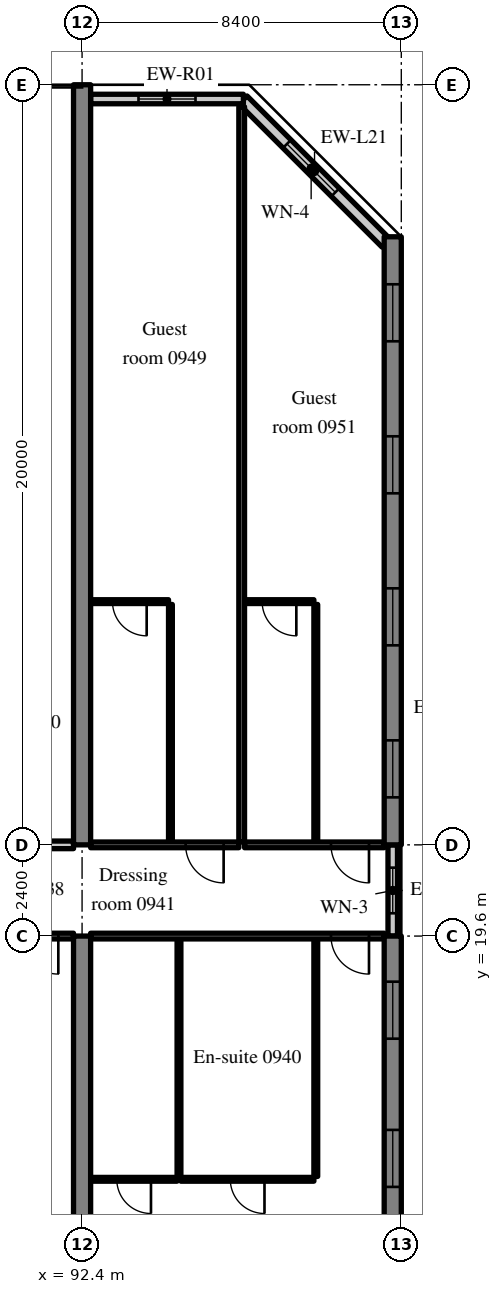
"""IFC4 building model, lengths in metres.
Left out: names, types, materials, properties, quantities, classifications, styles, units other than length and angle.
Written with IfcOpenShell. Run it as: python <this file> out.ifc"""

import sys

from ifc_helpers import new_model, si_unit, direction, frame, frame_2d, origin, place, context, subcontext, project, spatial, rectangle, extrude, source, transform, mapped, element, fill, save


model = new_model("IFC4")
c1 = context("Model", 3, precision=1e-05, world=origin(), true_north=direction((0.0, 1.0)))
c2 = subcontext(c1, "Body", "Model", "MODEL_VIEW")
j1 = project(units=[si_unit("LENGTHUNIT", "METRE"), si_unit("PLANEANGLEUNIT", "RADIAN")], contexts=[c1])
p1 = place(None, origin())
s1 = spatial("IfcSite", under=j1, at=p1, CompositionType="ELEMENT")
p2 = place(p1, origin())
s2 = spatial("IfcBuilding", under=s1, at=p2, CompositionType="ELEMENT")
p3 = place(p2, frame((0.0, 0.0, 43.0)))
s3 = spatial("IfcBuildingStorey", under=s2, at=p3, CompositionType="ELEMENT", Elevation=43.0)
m1 = source(origin(), c2, "Body", "SweptSolid", [
    extrude(rectangle(XDim=19.6, YDim=0.45, at=frame_2d((9.8, 0.0))), origin(), (0.0, 0.0, 1.0), 3.52),
])
p4 = place(p3, frame((92.4, 0.0, 0.0), z_axis=(0.0, 0.0, 1.0), x_axis=(0.0, 1.0, 0.0)))
e1 = element("IfcWall", 1, at=p4, inside=s3, PredefinedType="SHEAR", context=c2, shape_type="MappedRepresentation", body=[
    mapped(m1, transform((0.0, 0.0, 0.0), scale=1.0)),
])
m2 = source(origin(), c2, "Body", "SweptSolid", [
    extrude(rectangle(XDim=20.0, YDim=0.45, at=frame_2d((10.0, 0.0))), origin(), (0.0, 0.0, 1.0), 3.52),
])
p5 = place(p3, frame((92.4, 22.0, 0.0), z_axis=(0.0, 0.0, 1.0), x_axis=(0.0, 1.0, 0.0)))
e2 = element("IfcWall", 2, at=p5, inside=s3, PredefinedType="SHEAR", context=c2, shape_type="MappedRepresentation", body=[
    mapped(m2, transform((0.0, 0.0, 0.0), scale=1.0)),
])
m3 = source(origin(), c2, "Body", "SweptSolid", [
    extrude(rectangle(XDim=15.6, YDim=0.45, at=frame_2d((7.8, 0.0))), origin(), (0.0, 0.0, 1.0), 3.52),
])
p6 = place(p3, frame((100.575, 4.0, 0.0), z_axis=(0.0, 0.0, 1.0), x_axis=(0.0, 1.0, 0.0)))
e3 = element("IfcWall", 3, at=p6, inside=s3, PredefinedType="SHEAR", context=c2, shape_type="MappedRepresentation", body=[
    mapped(m3, transform((0.0, 0.0, 0.0), scale=1.0)),
])
m4 = source(origin(), c2, "Body", "SweptSolid", [
    extrude(rectangle(XDim=1.5, YDim=1.5, at=frame_2d((0.75, 0.75))), frame((0.0, 0.235, 0.0), z_axis=(0.0, -1.0, 0.0), x_axis=(1.0, 0.0, 0.0)), (0.0, 0.0, 1.0), 0.47),
])
p7 = place(p6, frame((1.2, 0.0, 0.9)))
e4 = element("IfcOpeningElement", 4, at=p7, cuts=e3, PredefinedType="OPENING", context=c2, shape_type="MappedRepresentation", body=[
    mapped(m4, transform((0.0, 0.0, 0.0), scale=1.0)),
])
p8 = place(p6, frame((5.1, 0.0, 0.9)))
e5 = element("IfcOpeningElement", 5, at=p8, cuts=e3, PredefinedType="OPENING", context=c2, shape_type="MappedRepresentation", body=[
    mapped(m4, transform((0.0, 0.0, 0.0), scale=1.0)),
])
p9 = place(p6, frame((9.0, 0.0, 0.9)))
e6 = element("IfcOpeningElement", 6, at=p9, cuts=e3, PredefinedType="OPENING", context=c2, shape_type="MappedRepresentation", body=[
    mapped(m4, transform((0.0, 0.0, 0.0), scale=1.0)),
])
p10 = place(p6, frame((12.9, 0.0, 0.9)))
e7 = element("IfcOpeningElement", 7, at=p10, cuts=e3, PredefinedType="OPENING", context=c2, shape_type="MappedRepresentation", body=[
    mapped(m4, transform((0.0, 0.0, 0.0), scale=1.0)),
])
m5 = source(origin(), c2, "Body", "SweptSolid", [
    extrude(rectangle(XDim=16.0, YDim=0.45, at=frame_2d((8.0, 0.0))), origin(), (0.0, 0.0, 1.0), 3.52),
])
p11 = place(p3, frame((100.575, 22.0, 0.0), z_axis=(0.0, 0.0, 1.0), x_axis=(0.0, 1.0, 0.0)))
e8 = element("IfcWall", 8, at=p11, inside=s3, PredefinedType="SHEAR", context=c2, shape_type="MappedRepresentation", body=[
    mapped(m5, transform((0.0, 0.0, 0.0), scale=1.0)),
])
p12 = place(p11, frame((1.25, 0.0, 0.9)))
e9 = element("IfcOpeningElement", 9, at=p12, cuts=e8, PredefinedType="OPENING", context=c2, shape_type="MappedRepresentation", body=[
    mapped(m4, transform((0.0, 0.0, 0.0), scale=1.0)),
])
p13 = place(p11, frame((5.25, 0.0, 0.9)))
e10 = element("IfcOpeningElement", 10, at=p13, cuts=e8, PredefinedType="OPENING", context=c2, shape_type="MappedRepresentation", body=[
    mapped(m4, transform((0.0, 0.0, 0.0), scale=1.0)),
])
p14 = place(p11, frame((9.25, 0.0, 0.9)))
e11 = element("IfcOpeningElement", 11, at=p14, cuts=e8, PredefinedType="OPENING", context=c2, shape_type="MappedRepresentation", body=[
    mapped(m4, transform((0.0, 0.0, 0.0), scale=1.0)),
])
p15 = place(p11, frame((13.25, 0.0, 0.9)))
e12 = element("IfcOpeningElement", 12, at=p15, cuts=e8, PredefinedType="OPENING", context=c2, shape_type="MappedRepresentation", body=[
    mapped(m4, transform((0.0, 0.0, 0.0), scale=1.0)),
])
m6 = source(origin(), c2, "Body", "SweptSolid", [
    extrude(rectangle(XDim=5.326, YDim=0.3, at=frame_2d((2.663, 0.0))), origin(), (0.0, 0.0, 1.0), 3.52),
])
p16 = place(p3, frame((100.4, 37.834, 0.0), z_axis=(0.0, 0.0, 1.0), x_axis=(-0.707083859269, 0.707129702361, 0.0)))
e13 = element("IfcWall", 13, at=p16, inside=s3, PredefinedType="SOLIDWALL", context=c2, shape_type="MappedRepresentation", body=[
    mapped(m6, transform((0.0, 0.0, 0.0), scale=1.0)),
])
m7 = source(origin(), c2, "Body", "SweptSolid", [
    extrude(rectangle(XDim=1.8, YDim=1.5, at=frame_2d((0.9, 0.75))), frame((0.0, 0.16, 0.0), z_axis=(0.0, -1.0, 0.0), x_axis=(1.0, 0.0, 0.0)), (0.0, 0.0, 1.0), 0.32),
])
p17 = place(p16, frame((1.889, 0.0, 0.9)))
e14 = element("IfcOpeningElement", 14, at=p17, cuts=e13, PredefinedType="OPENING", context=c2, shape_type="MappedRepresentation", body=[
    mapped(m7, transform((0.0, 0.0, 0.0), scale=1.0)),
])
m8 = source(origin(), c2, "Body", "SweptSolid", [
    extrude(rectangle(XDim=4.02, YDim=0.25, at=frame_2d((2.01, 0.0))), origin(), (0.0, 0.0, 1.0), 2.82),
])
p18 = place(p3, frame((96.645, 41.625, 0.0), z_axis=(0.0, 0.0, 1.0), x_axis=(-1.0, 0.0, 0.0)))
e15 = element("IfcWall", 15, at=p18, inside=s3, PredefinedType="SOLIDWALL", context=c2, shape_type="MappedRepresentation", body=[
    mapped(m8, transform((0.0, 0.0, 0.0), scale=1.0)),
])
m9 = source(origin(), c2, "Body", "SweptSolid", [
    extrude(rectangle(XDim=1.5, YDim=1.5, at=frame_2d((0.75, 0.75))), frame((0.0, 0.135, 0.0), z_axis=(0.0, -1.0, 0.0), x_axis=(1.0, 0.0, 0.0)), (0.0, 0.0, 1.0), 0.27),
])
p19 = place(p18, frame((1.26, 0.0, 0.9)))
e16 = element("IfcOpeningElement", 16, at=p19, cuts=e15, PredefinedType="OPENING", context=c2, shape_type="MappedRepresentation", body=[
    mapped(m9, transform((0.0, 0.0, 0.0), scale=1.0)),
])
m10 = source(origin(), c2, "Body", "SweptSolid", [
    extrude(rectangle(XDim=2.4, YDim=0.25, at=frame_2d((1.2, 0.0))), origin(), (0.0, 0.0, 1.0), 2.62),
])
p20 = place(p3, frame((100.575, 19.6, 0.0), z_axis=(0.0, 0.0, 1.0), x_axis=(0.0, 1.0, 0.0)))
e17 = element("IfcWall", 17, at=p20, inside=s3, PredefinedType="SOLIDWALL", context=c2, shape_type="MappedRepresentation", body=[
    mapped(m10, transform((0.0, 0.0, 0.0), scale=1.0)),
])
m11 = source(origin(), c2, "Body", "SweptSolid", [
    extrude(rectangle(XDim=1.2, YDim=1.5, at=frame_2d((0.6, 0.75))), frame((0.0, 0.135, 0.0), z_axis=(0.0, -1.0, 0.0), x_axis=(1.0, 0.0, 0.0)), (0.0, 0.0, 1.0), 0.27),
])
p21 = place(p20, frame((0.6, 0.0, 0.9)))
e18 = element("IfcOpeningElement", 18, at=p21, cuts=e17, PredefinedType="OPENING", context=c2, shape_type="MappedRepresentation", body=[
    mapped(m11, transform((0.0, 0.0, 0.0), scale=1.0)),
])
m12 = source(origin(), c2, "Body", "SweptSolid", [
    extrude(rectangle(XDim=7.95, YDim=0.15, at=frame_2d((3.975, 0.0))), origin(), (0.0, 0.0, 1.0), 2.82),
])
p22 = place(p3, frame((84.225, 19.6, 0.0), z_axis=(0.0, 0.0, 1.0), x_axis=(1.0, 0.0, 0.0)))
e19 = element("IfcWall", 19, at=p22, inside=s3, PredefinedType="PARTITIONING", context=c2, shape_type="MappedRepresentation", body=[
    mapped(m12, transform((0.0, 0.0, 0.0), scale=1.0)),
])
m13 = source(origin(), c2, "Body", "SweptSolid", [
    extrude(rectangle(XDim=1.0, YDim=2.1, at=frame_2d((0.5, 1.05))), frame((0.0, 0.085, 0.0), z_axis=(0.0, -1.0, 0.0), x_axis=(1.0, 0.0, 0.0)), (0.0, 0.0, 1.0), 0.17),
])
p23 = place(p22, frame((6.55, 0.0, 0.0)))
e20 = element("IfcOpeningElement", 20, at=p23, cuts=e19, PredefinedType="OPENING", context=c2, shape_type="MappedRepresentation", body=[
    mapped(m13, transform((0.0, 0.0, 0.0), scale=1.0)),
])
m14 = source(origin(), c2, "Body", "SweptSolid", [
    extrude(rectangle(XDim=6.25, YDim=0.1, at=frame_2d((3.125, 0.0))), origin(), (0.0, 0.0, 1.0), 3.52),
])
for number, where, z_axis, x_axis in (
    (21, (98.55, 13.275, 0.0), (0.0, 0.0, 1.0), (0.0, 1.0, 0.0)),
    (22, (94.95, 13.275, 0.0), (0.0, 0.0, 1.0), (0.0, 1.0, 0.0)),
):
    element("IfcWall", number, at=place(p3, frame(where, z_axis=z_axis, x_axis=x_axis)), inside=s3, PredefinedType="PARTITIONING", context=c2, shape_type="MappedRepresentation", body=[
        mapped(m14, transform((0.0, 0.0, 0.0), scale=1.0)),
    ])
m15 = source(origin(), c2, "Body", "SweptSolid", [
    extrude(rectangle(XDim=3.5, YDim=0.1, at=frame_2d((1.75, 0.0))), origin(), (0.0, 0.0, 1.0), 3.52),
])
p24 = place(p3, frame((95.0, 13.2, 0.0), z_axis=(0.0, 0.0, 1.0), x_axis=(1.0, 0.0, 0.0)))
e23 = element("IfcWall", 23, at=p24, inside=s3, PredefinedType="PARTITIONING", context=c2, shape_type="MappedRepresentation", body=[
    mapped(m15, transform((0.0, 0.0, 0.0), scale=1.0)),
])
m16 = source(origin(), c2, "Body", "SweptSolid", [
    extrude(rectangle(XDim=0.9, YDim=2.1, at=frame_2d((0.45, 1.05))), frame((0.0, 0.06, 0.0), z_axis=(0.0, -1.0, 0.0), x_axis=(1.0, 0.0, 0.0)), (0.0, 0.0, 1.0), 0.12),
])
p25 = place(p24, frame((1.3, 0.0, 0.0)))
e24 = element("IfcOpeningElement", 24, at=p25, cuts=e23, PredefinedType="OPENING", context=c2, shape_type="MappedRepresentation", body=[
    mapped(m16, transform((0.0, 0.0, 0.0), scale=1.0)),
])
m17 = source(origin(), c2, "Body", "SweptSolid", [
    extrude(rectangle(XDim=2.275, YDim=0.1, at=frame_2d((1.137, 0.0))), origin(), (0.0, 0.0, 1.0), 3.52),
])
p26 = place(p3, frame((92.625, 13.2, 0.0), z_axis=(0.0, 0.0, 1.0), x_axis=(1.0, 0.0, 0.0)))
e25 = element("IfcWall", 25, at=p26, inside=s3, PredefinedType="PARTITIONING", context=c2, shape_type="MappedRepresentation", body=[
    mapped(m17, transform((0.0, 0.0, 0.0), scale=1.0)),
])
p27 = place(p26, frame((0.688, 0.0, 0.0)))
e26 = element("IfcOpeningElement", 26, at=p27, cuts=e25, PredefinedType="OPENING", context=c2, shape_type="MappedRepresentation", body=[
    mapped(m16, transform((0.0, 0.0, 0.0), scale=1.0)),
])
m18 = source(origin(), c2, "Body", "SweptSolid", [
    extrude(rectangle(XDim=7.725, YDim=0.15, at=frame_2d((3.863, 0.0))), origin(), (0.0, 0.0, 1.0), 2.82),
])
p28 = place(p3, frame((92.625, 19.6, 0.0), z_axis=(0.0, 0.0, 1.0), x_axis=(1.0, 0.0, 0.0)))
e27 = element("IfcWall", 27, at=p28, inside=s3, PredefinedType="PARTITIONING", context=c2, shape_type="MappedRepresentation", body=[
    mapped(m18, transform((0.0, 0.0, 0.0), scale=1.0)),
])
p29 = place(p28, frame((6.325, 0.0, 0.0)))
e28 = element("IfcOpeningElement", 28, at=p29, cuts=e27, PredefinedType="OPENING", context=c2, shape_type="MappedRepresentation", body=[
    mapped(m13, transform((0.0, 0.0, 0.0), scale=1.0)),
])
p30 = place(p3, frame((94.725, 22.075, 0.0), z_axis=(0.0, 0.0, 1.0), x_axis=(0.0, 1.0, 0.0)))
e29 = element("IfcWall", 29, at=p30, inside=s3, PredefinedType="PARTITIONING", context=c2, shape_type="MappedRepresentation", body=[
    mapped(m14, transform((0.0, 0.0, 0.0), scale=1.0)),
])
m19 = source(origin(), c2, "Body", "SweptSolid", [
    extrude(rectangle(XDim=2.05, YDim=0.1, at=frame_2d((1.025, 0.0))), origin(), (0.0, 0.0, 1.0), 3.52),
])
p31 = place(p3, frame((92.625, 28.4, 0.0), z_axis=(0.0, 0.0, 1.0), x_axis=(1.0, 0.0, 0.0)))
e30 = element("IfcWall", 30, at=p31, inside=s3, PredefinedType="PARTITIONING", context=c2, shape_type="MappedRepresentation", body=[
    mapped(m19, transform((0.0, 0.0, 0.0), scale=1.0)),
])
p32 = place(p31, frame((0.575, 0.0, 0.0)))
e31 = element("IfcOpeningElement", 31, at=p32, cuts=e30, PredefinedType="OPENING", context=c2, shape_type="MappedRepresentation", body=[
    mapped(m16, transform((0.0, 0.0, 0.0), scale=1.0)),
])
m20 = source(origin(), c2, "Body", "SweptSolid", [
    extrude(rectangle(XDim=3.9, YDim=0.15, at=frame_2d((1.95, 0.0))), origin(), (0.0, 0.0, 1.0), 2.82),
])
p33 = place(p3, frame((92.625, 22.0, 0.0), z_axis=(0.0, 0.0, 1.0), x_axis=(1.0, 0.0, 0.0)))
e32 = element("IfcWall", 32, at=p33, inside=s3, PredefinedType="PARTITIONING", context=c2, shape_type="MappedRepresentation", body=[
    mapped(m20, transform((0.0, 0.0, 0.0), scale=1.0)),
])
p34 = place(p33, frame((2.5, 0.0, 0.0)))
e33 = element("IfcOpeningElement", 33, at=p34, cuts=e32, PredefinedType="OPENING", context=c2, shape_type="MappedRepresentation", body=[
    mapped(m13, transform((0.0, 0.0, 0.0), scale=1.0)),
])
p35 = place(p3, frame((98.55, 22.075, 0.0), z_axis=(0.0, 0.0, 1.0), x_axis=(0.0, 1.0, 0.0)))
e34 = element("IfcWall", 34, at=p35, inside=s3, PredefinedType="PARTITIONING", context=c2, shape_type="MappedRepresentation", body=[
    mapped(m14, transform((0.0, 0.0, 0.0), scale=1.0)),
])
m21 = source(origin(), c2, "Body", "SweptSolid", [
    extrude(rectangle(XDim=1.825, YDim=0.1, at=frame_2d((0.913, 0.0))), origin(), (0.0, 0.0, 1.0), 3.52),
])
p36 = place(p3, frame((96.675, 28.4, 0.0), z_axis=(0.0, 0.0, 1.0), x_axis=(1.0, 0.0, 0.0)))
e35 = element("IfcWall", 35, at=p36, inside=s3, PredefinedType="PARTITIONING", context=c2, shape_type="MappedRepresentation", body=[
    mapped(m21, transform((0.0, 0.0, 0.0), scale=1.0)),
])
p37 = place(p36, frame((0.463, 0.0, 0.0)))
e36 = element("IfcOpeningElement", 36, at=p37, cuts=e35, PredefinedType="OPENING", context=c2, shape_type="MappedRepresentation", body=[
    mapped(m16, transform((0.0, 0.0, 0.0), scale=1.0)),
])
m22 = source(origin(), c2, "Body", "SweptSolid", [
    extrude(rectangle(XDim=3.675, YDim=0.15, at=frame_2d((1.837, 0.0))), origin(), (0.0, 0.0, 1.0), 2.82),
])
p38 = place(p3, frame((96.675, 22.0, 0.0), z_axis=(0.0, 0.0, 1.0), x_axis=(1.0, 0.0, 0.0)))
e37 = element("IfcWall", 37, at=p38, inside=s3, PredefinedType="PARTITIONING", context=c2, shape_type="MappedRepresentation", body=[
    mapped(m22, transform((0.0, 0.0, 0.0), scale=1.0)),
])
p39 = place(p38, frame((2.275, 0.0, 0.0)))
e38 = element("IfcOpeningElement", 38, at=p39, cuts=e37, PredefinedType="OPENING", context=c2, shape_type="MappedRepresentation", body=[
    mapped(m13, transform((0.0, 0.0, 0.0), scale=1.0)),
])
m23 = source(origin(), c2, "Body", "SweptSolid", [
    extrude(rectangle(XDim=19.347, YDim=0.15, at=frame_2d((9.674, 0.0))), origin(), (0.0, 0.0, 1.0), 3.52),
])
p40 = place(p3, frame((96.6, 22.075, 0.0), z_axis=(0.0, 0.0, 1.0), x_axis=(0.0, 1.0, 0.0)))
e39 = element("IfcWall", 39, at=p40, inside=s3, PredefinedType="PARTITIONING", context=c2, shape_type="MappedRepresentation", body=[
    mapped(m23, transform((0.0, 0.0, 0.0), scale=1.0)),
])
m24 = source(origin(), c2, "Body", "SweptSolid", [
    extrude(rectangle(XDim=7.95, YDim=0.2, at=frame_2d((3.975, 0.0))), origin(), (0.0, 0.0, 1.0), 2.82),
])
p41 = place(p3, frame((84.225, 22.0, 0.0), z_axis=(0.0, 0.0, 1.0), x_axis=(1.0, 0.0, 0.0)))
e40 = element("IfcWall", 40, at=p41, inside=s3, PredefinedType="PARTITIONING", context=c2, shape_type="MappedRepresentation", body=[
    mapped(m24, transform((0.0, 0.0, 0.0), scale=1.0)),
])
m25 = source(origin(), c2, "Body", "SweptSolid", [
    extrude(rectangle(XDim=1.8, YDim=1.5, at=frame_2d((0.9, 0.75))), frame((0.0, 0.03, 0.0), z_axis=(0.0, -1.0, 0.0), x_axis=(1.0, 0.0, 0.0)), (0.0, 0.0, 1.0), 0.06),
])
p42 = place(p17, origin())
e41 = element("IfcWindow", 41, at=p42, inside=s3, PartitioningType="SINGLE_PANEL", PredefinedType="WINDOW", context=c2, shape_type="MappedRepresentation", body=[
    mapped(m25, transform((0.0, 0.0, 0.0), scale=1.0)),
])
fill(e14, e41)
m26 = source(origin(), c2, "Body", "SweptSolid", [
    extrude(rectangle(XDim=1.5, YDim=1.5, at=frame_2d((0.75, 0.75))), frame((0.0, 0.03, 0.0), z_axis=(0.0, -1.0, 0.0), x_axis=(1.0, 0.0, 0.0)), (0.0, 0.0, 1.0), 0.06),
])
p43 = place(p19, origin())
e42 = element("IfcWindow", 42, at=p43, inside=s3, PartitioningType="SINGLE_PANEL", PredefinedType="WINDOW", context=c2, shape_type="MappedRepresentation", body=[
    mapped(m26, transform((0.0, 0.0, 0.0), scale=1.0)),
])
fill(e16, e42)
p44 = place(p9, origin())
e43 = element("IfcWindow", 43, at=p44, inside=s3, PartitioningType="SINGLE_PANEL", PredefinedType="WINDOW", context=c2, shape_type="MappedRepresentation", body=[
    mapped(m26, transform((0.0, 0.0, 0.0), scale=1.0)),
])
fill(e6, e43)
p45 = place(p10, origin())
e44 = element("IfcWindow", 44, at=p45, inside=s3, PartitioningType="SINGLE_PANEL", PredefinedType="WINDOW", context=c2, shape_type="MappedRepresentation", body=[
    mapped(m26, transform((0.0, 0.0, 0.0), scale=1.0)),
])
fill(e7, e44)
p46 = place(p12, origin())
e45 = element("IfcWindow", 45, at=p46, inside=s3, PartitioningType="SINGLE_PANEL", PredefinedType="WINDOW", context=c2, shape_type="MappedRepresentation", body=[
    mapped(m26, transform((0.0, 0.0, 0.0), scale=1.0)),
])
fill(e9, e45)
p47 = place(p13, origin())
e46 = element("IfcWindow", 46, at=p47, inside=s3, PartitioningType="SINGLE_PANEL", PredefinedType="WINDOW", context=c2, shape_type="MappedRepresentation", body=[
    mapped(m26, transform((0.0, 0.0, 0.0), scale=1.0)),
])
fill(e10, e46)
p48 = place(p14, origin())
e47 = element("IfcWindow", 47, at=p48, inside=s3, PartitioningType="SINGLE_PANEL", PredefinedType="WINDOW", context=c2, shape_type="MappedRepresentation", body=[
    mapped(m26, transform((0.0, 0.0, 0.0), scale=1.0)),
])
fill(e11, e47)
p49 = place(p15, origin())
e48 = element("IfcWindow", 48, at=p49, inside=s3, PartitioningType="SINGLE_PANEL", PredefinedType="WINDOW", context=c2, shape_type="MappedRepresentation", body=[
    mapped(m26, transform((0.0, 0.0, 0.0), scale=1.0)),
])
fill(e12, e48)
m27 = source(origin(), c2, "Body", "SweptSolid", [
    extrude(rectangle(XDim=1.2, YDim=1.5, at=frame_2d((0.6, 0.75))), frame((0.0, 0.03, 0.0), z_axis=(0.0, -1.0, 0.0), x_axis=(1.0, 0.0, 0.0)), (0.0, 0.0, 1.0), 0.06),
])
p50 = place(p21, origin())
e49 = element("IfcWindow", 49, at=p50, inside=s3, PartitioningType="SINGLE_PANEL", PredefinedType="WINDOW", context=c2, shape_type="MappedRepresentation", body=[
    mapped(m27, transform((0.0, 0.0, 0.0), scale=1.0)),
])
fill(e18, e49)
m28 = source(origin(), c2, "Body", "SweptSolid", [
    extrude(rectangle(XDim=1.0, YDim=2.1, at=frame_2d((0.5, 1.05))), frame((0.0, 0.025, 0.0), z_axis=(0.0, -1.0, 0.0), x_axis=(1.0, 0.0, 0.0)), (0.0, 0.0, 1.0), 0.05),
])
p51 = place(p23, origin())
e50 = element("IfcDoor", 50, at=p51, inside=s3, OperationType="SINGLE_SWING_RIGHT", PredefinedType="DOOR", context=c2, shape_type="MappedRepresentation", body=[
    mapped(m28, transform((0.0, 0.0, 0.0), scale=1.0)),
])
fill(e20, e50)
m29 = source(origin(), c2, "Body", "SweptSolid", [
    extrude(rectangle(XDim=0.9, YDim=2.1, at=frame_2d((0.45, 1.05))), frame((0.0, 0.025, 0.0), z_axis=(0.0, -1.0, 0.0), x_axis=(1.0, 0.0, 0.0)), (0.0, 0.0, 1.0), 0.05),
])
p52 = place(p25, origin())
e51 = element("IfcDoor", 51, at=p52, inside=s3, OperationType="SINGLE_SWING_RIGHT", PredefinedType="DOOR", context=c2, shape_type="MappedRepresentation", body=[
    mapped(m29, transform((0.0, 0.0, 0.0), scale=1.0)),
])
fill(e24, e51)
p53 = place(p27, origin())
e52 = element("IfcDoor", 52, at=p53, inside=s3, OperationType="SINGLE_SWING_RIGHT", PredefinedType="DOOR", context=c2, shape_type="MappedRepresentation", body=[
    mapped(m29, transform((0.0, 0.0, 0.0), scale=1.0)),
])
fill(e26, e52)
p54 = place(p29, origin())
e53 = element("IfcDoor", 53, at=p54, inside=s3, OperationType="SINGLE_SWING_RIGHT", PredefinedType="DOOR", context=c2, shape_type="MappedRepresentation", body=[
    mapped(m28, transform((0.0, 0.0, 0.0), scale=1.0)),
])
fill(e28, e53)
p55 = place(p32, origin())
e54 = element("IfcDoor", 54, at=p55, inside=s3, OperationType="SINGLE_SWING_RIGHT", PredefinedType="DOOR", context=c2, shape_type="MappedRepresentation", body=[
    mapped(m29, transform((0.0, 0.0, 0.0), scale=1.0)),
])
fill(e31, e54)
p56 = place(p34, origin())
e55 = element("IfcDoor", 55, at=p56, inside=s3, OperationType="SINGLE_SWING_RIGHT", PredefinedType="DOOR", context=c2, shape_type="MappedRepresentation", body=[
    mapped(m28, transform((0.0, 0.0, 0.0), scale=1.0)),
])
fill(e33, e55)
p57 = place(p37, origin())
e56 = element("IfcDoor", 56, at=p57, inside=s3, OperationType="SINGLE_SWING_RIGHT", PredefinedType="DOOR", context=c2, shape_type="MappedRepresentation", body=[
    mapped(m29, transform((0.0, 0.0, 0.0), scale=1.0)),
])
fill(e36, e56)
p58 = place(p39, origin())
e57 = element("IfcDoor", 57, at=p58, inside=s3, OperationType="SINGLE_SWING_RIGHT", PredefinedType="DOOR", context=c2, shape_type="MappedRepresentation", body=[
    mapped(m28, transform((0.0, 0.0, 0.0), scale=1.0)),
])
fill(e38, e57)
save(model, sys.argv[1])
